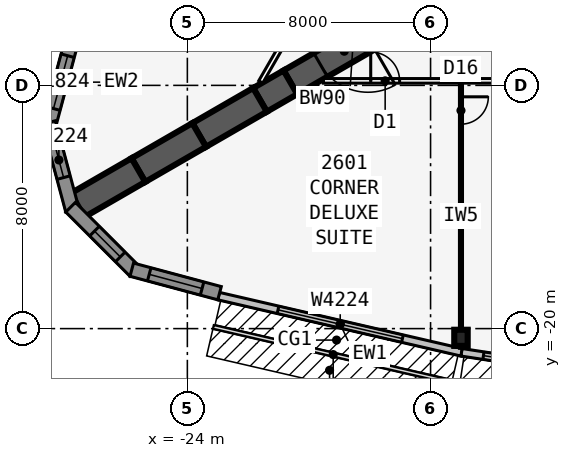
"""IFC4 building model, lengths in metres.
Left out: names, types, materials, properties, quantities, classifications, styles, units other than length and angle.
Written with IfcOpenShell. Run it as: python <this file> out.ifc"""

import sys

from ifc_helpers import new_model, si_unit, direction, frame, frame_2d, origin, origin_2d, place, context, subcontext, project, spatial, polyline, rectangle, i_section, outline, extrude, element, fill, save


model = new_model("IFC4")
c1 = context("Model", 3, precision=1e-05, world=origin(), true_north=direction((0.0, 1.0)))
c2 = subcontext(c1, "Body", "Model", "MODEL_VIEW")
j1 = project(units=[si_unit("LENGTHUNIT", "METRE"), si_unit("PLANEANGLEUNIT", "RADIAN")], contexts=[c1])
p1 = place(None, origin())
s1 = spatial("IfcSite", under=j1, at=p1, CompositionType="ELEMENT")
p2 = place(p1, origin())
s2 = spatial("IfcBuilding", under=s1, at=p2, CompositionType="ELEMENT")
p3 = place(p2, frame((0.0, 0.0, 99.9)))
s3 = spatial("IfcBuildingStorey", under=s2, at=p3, CompositionType="ELEMENT", Elevation=99.9)
p4 = place(p3, frame((-16.5, -9.526, 0.0), z_axis=(0.0, 0.0, 1.0), x_axis=(-0.866031398331, -0.499989616998, 0.0)))
e1 = element("IfcWall", 1, at=p4, inside=s3, PredefinedType="SHEAR", context=c2, shape_type="SweptSolid", body=[
    extrude(rectangle(XDim=4.746, YDim=0.9, at=frame_2d((2.373, 0.0))), origin(), (0.0, 0.0, 1.0), 3.4),
])
p5 = place(p4, frame((1.8, 0.0, 0.0)))
e2 = element("IfcOpeningElement", 2, at=p5, cuts=e1, PredefinedType="OPENING", context=c2, shape_type="SweptSolid", body=[
    extrude(rectangle(XDim=1.8, YDim=2.13, at=frame_2d((0.9, 1.065))), frame((0.0, 0.46, 0.0), z_axis=(0.0, -1.0, 0.0), x_axis=(1.0, 0.0, 0.0)), (0.0, 0.0, 1.0), 0.92),
])
p6 = place(p3, frame((-20.61, -11.899, 0.0), z_axis=(0.0, 0.0, 1.0), x_axis=(-0.866009537788, -0.500027479704, 0.0)))
e3 = element("IfcWall", 3, at=p6, inside=s3, PredefinedType="SHEAR", context=c2, shape_type="SweptSolid", body=[
    extrude(rectangle(XDim=1.155, YDim=0.9, at=frame_2d((0.577, 0.0))), origin(), (0.0, 0.0, 1.0), 3.4),
])
for number, where, z_axis, x_axis in (
    (4, (-21.61, -12.477, 0.0), (0.0, 0.0, 1.0), (-0.866, -0.5, 0.0)),
    (5, (-23.61, -13.631, 0.0), (0.0, 0.0, 1.0), (-0.866, -0.5, 0.0)),
    (6, (-25.61, -14.786, 0.0), (0.0, 0.0, 1.0), (-0.866, -0.5, 0.0)),
):
    element("IfcWall", number, at=place(p3, frame(where, z_axis=z_axis, x_axis=x_axis)), inside=s3, PredefinedType="SHEAR", context=c2, shape_type="SweptSolid", body=[
        extrude(rectangle(XDim=2.309, YDim=0.9, at=frame_2d((1.155, 0.0))), origin(), (0.0, 0.0, 1.0), 3.4),
    ])
p7 = place(p3, frame((-15.0, -20.303, 0.0), z_axis=(0.0, 0.0, 1.0), x_axis=(1.0, 0.0, 0.0)))
e7 = element("IfcColumn", 7, at=p7, inside=s3, PredefinedType="COLUMN", context=c2, shape_type="SweptSolid", body=[
    extrude(i_section(OverallWidth=0.442, OverallDepth=0.531, WebThickness=0.066, FlangeThickness=0.106, at=origin_2d()), origin(), (0.0, 0.0, 1.0), 3.4),
])
p8 = place(p3, frame((-22.972, -18.931, 0.0), z_axis=(0.0, 0.0, 1.0), x_axis=(0.974279327392, -0.225343720163, 0.0)))
e8 = element("IfcWall", 8, at=p8, inside=s3, PredefinedType="STANDARD", context=c2, shape_type="SweptSolid", body=[
    extrude(rectangle(XDim=8.211, YDim=0.25, at=frame_2d((4.105, 0.0))), origin(), (0.0, 0.0, 1.0), 3.15),
])
p9 = place(p8, frame((2.006, 0.0, 0.45)))
e9 = element("IfcOpeningElement", 9, at=p9, cuts=e8, PredefinedType="OPENING", context=c2, shape_type="SweptSolid", body=[
    extrude(rectangle(XDim=4.2, YDim=2.4, at=frame_2d((2.1, 1.2))), frame((0.0, 0.135, 0.0), z_axis=(0.0, -1.0, 0.0), x_axis=(1.0, 0.0, 0.0)), (0.0, 0.0, 1.0), 0.27),
])
p10 = place(p3, frame((-14.981, -20.779, 0.0), z_axis=(0.0, 0.0, 1.0), x_axis=(0.988615403399, -0.150464561152, 0.0)))
e10 = element("IfcWall", 10, at=p10, inside=s3, PredefinedType="STANDARD", context=c2, shape_type="SweptSolid", body=[
    extrude(rectangle(XDim=5.058, YDim=0.25, at=frame_2d((2.529, 0.0))), origin(), (0.0, 0.0, 1.0), 3.15),
])
p11 = place(p10, frame((0.729, 0.0, 0.45)))
e11 = element("IfcOpeningElement", 11, at=p11, cuts=e10, PredefinedType="OPENING", context=c2, shape_type="SweptSolid", body=[
    extrude(rectangle(XDim=3.6, YDim=2.4, at=frame_2d((1.8, 1.2))), frame((0.0, 0.135, 0.0), z_axis=(0.0, -1.0, 0.0), x_axis=(1.0, 0.0, 0.0)), (0.0, 0.0, 1.0), 0.27),
])
p12 = place(p3, frame((-27.783, -10.45, 0.0), z_axis=(0.0, 0.0, 1.0), x_axis=(-0.258780998834, -0.965936019953, 0.0)))
e12 = element("IfcWall", 12, at=p12, inside=s3, PredefinedType="SOLIDWALL", context=c2, shape_type="SweptSolid", body=[
    extrude(rectangle(XDim=2.989, YDim=0.45, at=frame_2d((1.494, 0.0))), origin(), (0.0, 0.0, 1.0), 3.15),
])
p13 = place(p12, frame((0.594, 0.0, 0.45)))
e13 = element("IfcOpeningElement", 13, at=p13, cuts=e12, PredefinedType="OPENING", context=c2, shape_type="SweptSolid", body=[
    extrude(rectangle(XDim=1.8, YDim=2.4, at=frame_2d((0.9, 1.2))), frame((0.0, 0.235, 0.0), z_axis=(0.0, -1.0, 0.0), x_axis=(1.0, 0.0, 0.0)), (0.0, 0.0, 1.0), 0.47),
])
p14 = place(p3, frame((-28.556, -13.221, 0.0), z_axis=(0.0, 0.0, 1.0), x_axis=(0.258801419081, -0.965930548995, 0.0)))
e14 = element("IfcWall", 14, at=p14, inside=s3, PredefinedType="SOLIDWALL", context=c2, shape_type="SweptSolid", body=[
    extrude(outline(polyline([(2.989, 0.225), (2.929, 0.225), (2.437, 0.093), (2.402, 0.225), (0.0, 0.225), (0.0, -0.225), (2.989, -0.225), (2.989, 0.225)])), origin(), (0.0, 0.0, 1.0), 3.15),
])
p15 = place(p14, frame((0.676, 0.0, 0.45)))
e15 = element("IfcOpeningElement", 15, at=p15, cuts=e14, PredefinedType="OPENING", context=c2, shape_type="SweptSolid", body=[
    extrude(rectangle(XDim=1.2, YDim=2.4, at=frame_2d((0.6, 1.2))), frame((0.0, 0.235, 0.0), z_axis=(0.0, -1.0, 0.0), x_axis=(1.0, 0.0, 0.0)), (0.0, 0.0, 1.0), 0.47),
])
p16 = place(p3, frame((-27.841, -16.007, 0.0), z_axis=(0.0, 0.0, 1.0), x_axis=(0.707025086683, -0.707188466253, 0.0)))
e16 = element("IfcWall", 16, at=p16, inside=s3, PredefinedType="SOLIDWALL", context=c2, shape_type="SweptSolid", body=[
    extrude(outline(polyline([(2.989, 0.225), (0.586, 0.225), (0.551, 0.093), (0.059, 0.225), (0.0, 0.225), (0.0, -0.225), (2.989, -0.225), (2.989, 0.225)])), origin(), (0.0, 0.0, 1.0), 3.15),
])
p17 = place(p16, frame((1.113, 0.0, 0.45)))
e17 = element("IfcOpeningElement", 17, at=p17, cuts=e16, PredefinedType="OPENING", context=c2, shape_type="SweptSolid", body=[
    extrude(rectangle(XDim=1.2, YDim=2.4, at=frame_2d((0.6, 1.2))), frame((0.0, 0.235, 0.0), z_axis=(0.0, -1.0, 0.0), x_axis=(1.0, 0.0, 0.0)), (0.0, 0.0, 1.0), 0.47),
])
p18 = place(p3, frame((-25.829, -18.062, 0.0), z_axis=(0.0, 0.0, 1.0), x_axis=(0.965930548995, -0.258801419081, 0.0)))
e18 = element("IfcWall", 18, at=p18, inside=s3, PredefinedType="SOLIDWALL", context=c2, shape_type="SweptSolid", body=[
    extrude(rectangle(XDim=2.989, YDim=0.45, at=frame_2d((1.494, 0.0))), origin(), (0.0, 0.0, 1.0), 3.15),
])
p19 = place(p18, frame((0.594, 0.0, 0.45)))
e19 = element("IfcOpeningElement", 19, at=p19, cuts=e18, PredefinedType="OPENING", context=c2, shape_type="SweptSolid", body=[
    extrude(rectangle(XDim=1.8, YDim=2.4, at=frame_2d((0.9, 1.2))), frame((0.0, 0.235, 0.0), z_axis=(0.0, -1.0, 0.0), x_axis=(1.0, 0.0, 0.0)), (0.0, 0.0, 1.0), 0.47),
])
p20 = place(p3, frame((-19.527, -11.851, 0.0), z_axis=(0.0, 0.0, 1.0), x_axis=(1.0, 0.0, 0.0)))
e20 = element("IfcWall", 20, at=p20, inside=s3, PredefinedType="PARTITIONING", context=c2, shape_type="SweptSolid", body=[
    extrude(rectangle(XDim=39.054, YDim=0.15, at=frame_2d((19.527, 0.0))), origin(), (0.0, 0.0, 1.0), 3.15),
])
p21 = place(p20, frame((1.558, 0.0, 0.0)))
e21 = element("IfcOpeningElement", 21, at=p21, cuts=e20, PredefinedType="OPENING", context=c2, shape_type="SweptSolid", body=[
    extrude(rectangle(XDim=0.95, YDim=2.13, at=frame_2d((0.475, 1.065))), frame((0.0, 0.085, 0.0), z_axis=(0.0, -1.0, 0.0), x_axis=(1.0, 0.0, 0.0)), (0.0, 0.0, 1.0), 0.17),
])
p22 = place(p20, frame((11.552, 0.0, 0.0)))
e22 = element("IfcOpeningElement", 22, at=p22, cuts=e20, PredefinedType="OPENING", context=c2, shape_type="SweptSolid", body=[
    extrude(rectangle(XDim=0.95, YDim=2.13, at=frame_2d((0.475, 1.065))), frame((0.0, 0.085, 0.0), z_axis=(0.0, -1.0, 0.0), x_axis=(1.0, 0.0, 0.0)), (0.0, 0.0, 1.0), 0.17),
])
p23 = place(p20, frame((21.527, 0.0, 0.0)))
e23 = element("IfcOpeningElement", 23, at=p23, cuts=e20, PredefinedType="OPENING", context=c2, shape_type="SweptSolid", body=[
    extrude(rectangle(XDim=1.0, YDim=2.13, at=frame_2d((0.5, 1.065))), frame((0.0, 0.085, 0.0), z_axis=(0.0, -1.0, 0.0), x_axis=(1.0, 0.0, 0.0)), (0.0, 0.0, 1.0), 0.17),
])
p24 = place(p20, frame((26.552, 0.0, 0.0)))
e24 = element("IfcOpeningElement", 24, at=p24, cuts=e20, PredefinedType="OPENING", context=c2, shape_type="SweptSolid", body=[
    extrude(rectangle(XDim=0.95, YDim=2.13, at=frame_2d((0.475, 1.065))), frame((0.0, 0.085, 0.0), z_axis=(0.0, -1.0, 0.0), x_axis=(1.0, 0.0, 0.0)), (0.0, 0.0, 1.0), 0.17),
])
p25 = place(p20, frame((37.752, 0.0, 0.0)))
e25 = element("IfcOpeningElement", 25, at=p25, cuts=e20, PredefinedType="OPENING", context=c2, shape_type="SweptSolid", body=[
    extrude(rectangle(XDim=0.95, YDim=2.13, at=frame_2d((0.475, 1.065))), frame((0.0, 0.085, 0.0), z_axis=(0.0, -1.0, 0.0), x_axis=(1.0, 0.0, 0.0)), (0.0, 0.0, 1.0), 0.17),
])
p26 = place(p3, frame((-15.0, -11.926, 0.0), z_axis=(0.0, 0.0, 1.0), x_axis=(0.0, -1.0, 0.0)))
e26 = element("IfcWall", 26, at=p26, inside=s3, PredefinedType="PARTITIONING", context=c2, shape_type="SweptSolid", body=[
    extrude(rectangle(XDim=8.72, YDim=0.1, at=frame_2d((4.36, 0.0))), origin(), (0.0, 0.0, 1.0), 2.05),
])
p27 = place(p26, frame((0.45, 0.0, 0.0)))
e27 = element("IfcOpeningElement", 27, at=p27, cuts=e26, PredefinedType="OPENING", context=c2, shape_type="SweptSolid", body=[
    extrude(rectangle(XDim=0.9, YDim=2.032, at=frame_2d((0.45, 1.016))), frame((0.0, 0.06, 0.0), z_axis=(0.0, -1.0, 0.0), x_axis=(1.0, 0.0, 0.0)), (0.0, 0.0, 1.0), 0.12),
])
p28 = place(p3, frame((-0.5, 24.636, 0.0), z_axis=(0.0, 0.0, 1.0), x_axis=(-0.500001915564, -0.86602429783, 0.0)))
e28 = element("IfcWall", 28, at=p28, inside=s3, PredefinedType="PARTITIONING", context=c2, shape_type="SweptSolid", body=[
    extrude(rectangle(XDim=42.172, YDim=0.15, at=frame_2d((21.086, 0.0))), origin(), (0.0, 0.0, 1.0), 3.15),
])
p29 = place(p28, frame((1.911, 0.0, 0.0)))
e29 = element("IfcOpeningElement", 29, at=p29, cuts=e28, PredefinedType="OPENING", context=c2, shape_type="SweptSolid", body=[
    extrude(rectangle(XDim=0.95, YDim=2.13, at=frame_2d((0.475, 1.065))), frame((0.0, 0.085, 0.0), z_axis=(0.0, -1.0, 0.0), x_axis=(1.0, 0.0, 0.0)), (0.0, 0.0, 1.0), 0.17),
])
p30 = place(p28, frame((8.111, 0.0, 0.0)))
e30 = element("IfcOpeningElement", 30, at=p30, cuts=e28, PredefinedType="OPENING", context=c2, shape_type="SweptSolid", body=[
    extrude(rectangle(XDim=0.95, YDim=2.13, at=frame_2d((0.475, 1.065))), frame((0.0, 0.085, 0.0), z_axis=(0.0, -1.0, 0.0), x_axis=(1.0, 0.0, 0.0)), (0.0, 0.0, 1.0), 0.17),
])
p31 = place(p28, frame((18.111, 0.0, 0.0)))
e31 = element("IfcOpeningElement", 31, at=p31, cuts=e28, PredefinedType="OPENING", context=c2, shape_type="SweptSolid", body=[
    extrude(rectangle(XDim=0.95, YDim=2.13, at=frame_2d((0.475, 1.065))), frame((0.0, 0.085, 0.0), z_axis=(0.0, -1.0, 0.0), x_axis=(1.0, 0.0, 0.0)), (0.0, 0.0, 1.0), 0.17),
])
p32 = place(p28, frame((28.711, 0.0, 0.0)))
e32 = element("IfcOpeningElement", 32, at=p32, cuts=e28, PredefinedType="OPENING", context=c2, shape_type="SweptSolid", body=[
    extrude(rectangle(XDim=0.95, YDim=2.13, at=frame_2d((0.475, 1.065))), frame((0.0, 0.085, 0.0), z_axis=(0.0, -1.0, 0.0), x_axis=(1.0, 0.0, 0.0)), (0.0, 0.0, 1.0), 0.17),
])
p33 = place(p28, frame((33.711, 0.0, 0.0)))
e33 = element("IfcOpeningElement", 33, at=p33, cuts=e28, PredefinedType="OPENING", context=c2, shape_type="SweptSolid", body=[
    extrude(rectangle(XDim=0.95, YDim=2.13, at=frame_2d((0.475, 1.065))), frame((0.0, 0.085, 0.0), z_axis=(0.0, -1.0, 0.0), x_axis=(1.0, 0.0, 0.0)), (0.0, 0.0, 1.0), 0.17),
])
p34 = place(p28, frame((39.311, 0.0, 0.0)))
e34 = element("IfcOpeningElement", 34, at=p34, cuts=e28, PredefinedType="OPENING", context=c2, shape_type="SweptSolid", body=[
    extrude(rectangle(XDim=0.95, YDim=2.13, at=frame_2d((0.475, 1.065))), frame((0.0, 0.085, 0.0), z_axis=(0.0, -1.0, 0.0), x_axis=(1.0, 0.0, 0.0)), (0.0, 0.0, 1.0), 0.17),
])
p35 = place(p9, origin())
e35 = element("IfcWindow", 35, at=p35, inside=s3, PartitioningType="SINGLE_PANEL", PredefinedType="WINDOW", context=c2, shape_type="SweptSolid", body=[
    extrude(rectangle(XDim=4.2, YDim=2.4, at=frame_2d((2.1, 1.2))), frame((0.0, 0.03, 0.0), z_axis=(0.0, -1.0, 0.0), x_axis=(1.0, 0.0, 0.0)), (0.0, 0.0, 1.0), 0.06),
])
fill(e9, e35)
p36 = place(p11, origin())
e36 = element("IfcWindow", 36, at=p36, inside=s3, PartitioningType="SINGLE_PANEL", PredefinedType="WINDOW", context=c2, shape_type="SweptSolid", body=[
    extrude(rectangle(XDim=3.6, YDim=2.4, at=frame_2d((1.8, 1.2))), frame((0.0, 0.03, 0.0), z_axis=(0.0, -1.0, 0.0), x_axis=(1.0, 0.0, 0.0)), (0.0, 0.0, 1.0), 0.06),
])
fill(e11, e36)
p37 = place(p13, origin())
e37 = element("IfcWindow", 37, at=p37, inside=s3, PartitioningType="SINGLE_PANEL", PredefinedType="WINDOW", context=c2, shape_type="SweptSolid", body=[
    extrude(rectangle(XDim=1.8, YDim=2.4, at=frame_2d((0.9, 1.2))), frame((0.0, 0.03, 0.0), z_axis=(0.0, -1.0, 0.0), x_axis=(1.0, 0.0, 0.0)), (0.0, 0.0, 1.0), 0.06),
])
fill(e13, e37)
p38 = place(p15, origin())
e38 = element("IfcWindow", 38, at=p38, inside=s3, PartitioningType="SINGLE_PANEL", PredefinedType="WINDOW", context=c2, shape_type="SweptSolid", body=[
    extrude(rectangle(XDim=1.2, YDim=2.4, at=frame_2d((0.6, 1.2))), frame((0.0, 0.03, 0.0), z_axis=(0.0, -1.0, 0.0), x_axis=(1.0, 0.0, 0.0)), (0.0, 0.0, 1.0), 0.06),
])
fill(e15, e38)
p39 = place(p17, origin())
e39 = element("IfcWindow", 39, at=p39, inside=s3, PartitioningType="SINGLE_PANEL", PredefinedType="WINDOW", context=c2, shape_type="SweptSolid", body=[
    extrude(rectangle(XDim=1.2, YDim=2.4, at=frame_2d((0.6, 1.2))), frame((0.0, 0.03, 0.0), z_axis=(0.0, -1.0, 0.0), x_axis=(1.0, 0.0, 0.0)), (0.0, 0.0, 1.0), 0.06),
])
fill(e17, e39)
p40 = place(p19, origin())
e40 = element("IfcWindow", 40, at=p40, inside=s3, PartitioningType="SINGLE_PANEL", PredefinedType="WINDOW", context=c2, shape_type="SweptSolid", body=[
    extrude(rectangle(XDim=1.8, YDim=2.4, at=frame_2d((0.9, 1.2))), frame((0.0, 0.03, 0.0), z_axis=(0.0, -1.0, 0.0), x_axis=(1.0, 0.0, 0.0)), (0.0, 0.0, 1.0), 0.06),
])
fill(e19, e40)
p41 = place(p27, origin())
e41 = element("IfcDoor", 41, at=p41, inside=s3, OperationType="SINGLE_SWING_LEFT", PredefinedType="DOOR", context=c2, shape_type="SweptSolid", body=[
    extrude(rectangle(XDim=0.9, YDim=2.032, at=frame_2d((0.45, 1.016))), frame((0.0, 0.025, 0.0), z_axis=(0.0, -1.0, 0.0), x_axis=(1.0, 0.0, 0.0)), (0.0, 0.0, 1.0), 0.05),
])
fill(e27, e41)
p42 = place(p21, origin())
e42 = element("IfcDoor", 42, at=p42, inside=s3, OperationType="SINGLE_SWING_LEFT", PredefinedType="DOOR", context=c2, shape_type="SweptSolid", body=[
    extrude(rectangle(XDim=0.95, YDim=2.13, at=frame_2d((0.475, 1.065))), frame((0.0, 0.025, 0.0), z_axis=(0.0, -1.0, 0.0), x_axis=(1.0, 0.0, 0.0)), (0.0, 0.0, 1.0), 0.05),
])
fill(e21, e42)
p43 = place(p5, origin())
e43 = element("IfcDoor", 43, at=p43, inside=s3, OperationType="DOUBLE_DOOR_DOUBLE_SWING", PredefinedType="DOOR", context=c2, shape_type="SweptSolid", body=[
    extrude(rectangle(XDim=1.8, YDim=2.13, at=frame_2d((0.9, 1.065))), frame((0.0, 0.025, 0.0), z_axis=(0.0, -1.0, 0.0), x_axis=(1.0, 0.0, 0.0)), (0.0, 0.0, 1.0), 0.05),
])
fill(e2, e43)
save(model, sys.argv[1])
